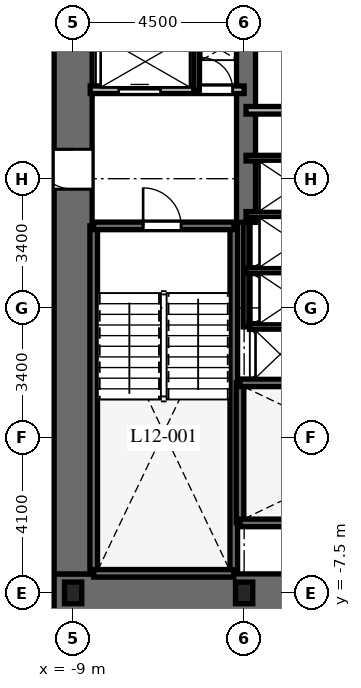
"""IFC4 building model, lengths in metres.
Left out: names, types, materials, properties, quantities, classifications, styles, units other than length and angle.
Written with IfcOpenShell. Run it as: python <this file> out.ifc"""

import sys

from ifc_helpers import new_model, si_unit, direction, frame, frame_2d, origin, origin_2d, place, context, subcontext, project, spatial, rectangle, i_section, extrude, element, fill, save


model = new_model("IFC4")
c1 = context("Model", 3, precision=1e-05, world=origin(), true_north=direction((0.0, 1.0)))
c2 = subcontext(c1, "Body", "Model", "MODEL_VIEW")
j1 = project(units=[si_unit("LENGTHUNIT", "METRE"), si_unit("PLANEANGLEUNIT", "RADIAN")], contexts=[c1])
p1 = place(None, origin())
s1 = spatial("IfcSite", under=j1, at=p1, CompositionType="ELEMENT")
p2 = place(p1, origin())
s2 = spatial("IfcBuilding", under=s1, at=p2, CompositionType="ELEMENT")
p3 = place(p2, frame((0.0, 0.0, 56.4)))
s3 = spatial("IfcBuildingStorey", under=s2, at=p3, CompositionType="ELEMENT", Elevation=56.4)
p4 = place(p3, frame((-9.5, -7.5, 0.0), z_axis=(0.0, 0.0, 1.0), x_axis=(1.0, 0.0, 0.0)))
e1 = element("IfcWall", 1, at=p4, inside=s3, PredefinedType="SHEAR", context=c2, shape_type="SweptSolid", body=[
    extrude(rectangle(XDim=19.0, YDim=1.0, at=frame_2d((9.5, 0.0))), origin(), (0.0, 0.0, 1.0), 3.7),
])
p5 = place(p4, frame((9.55, 0.0, 0.0)))
e2 = element("IfcOpeningElement", 2, at=p5, cuts=e1, PredefinedType="OPENING", context=c2, shape_type="SweptSolid", body=[
    extrude(rectangle(XDim=1.0, YDim=2.15, at=frame_2d((0.5, 1.075))), frame((0.0, 0.51, 0.0), z_axis=(0.0, -1.0, 0.0), x_axis=(1.0, 0.0, 0.0)), (0.0, 0.0, 1.0), 1.02),
])
p6 = place(p3, frame((-9.0, -7.0, 0.0), z_axis=(0.0, 0.0, 1.0), x_axis=(0.0, 1.0, 0.0)))
e3 = element("IfcWall", 3, at=p6, inside=s3, PredefinedType="SHEAR", context=c2, shape_type="SweptSolid", body=[
    extrude(rectangle(XDim=14.0, YDim=1.0, at=frame_2d((7.0, 0.0))), origin(), (0.0, 0.0, 1.0), 3.7),
])
p7 = place(p6, frame((10.125, 0.0, 0.0)))
e4 = element("IfcOpeningElement", 4, at=p7, cuts=e3, PredefinedType="OPENING", context=c2, shape_type="SweptSolid", body=[
    extrude(rectangle(XDim=1.05, YDim=2.15, at=frame_2d((0.525, 1.075))), frame((0.0, 0.51, 0.0), z_axis=(0.0, -1.0, 0.0), x_axis=(1.0, 0.0, 0.0)), (0.0, 0.0, 1.0), 1.02),
])
p8 = place(p3, frame((-4.45, 2.25, 0.0), z_axis=(0.0, 0.0, 1.0), x_axis=(0.0, 1.0, 0.0)))
e5 = element("IfcWall", 5, at=p8, inside=s3, PredefinedType="SHEAR", context=c2, shape_type="SweptSolid", body=[
    extrude(rectangle(XDim=4.75, YDim=0.5, at=frame_2d((2.375, 0.0))), origin(), (0.0, 0.0, 1.0), 3.7),
])
for number, where, z_axis, x_axis in (
    (6, (-8.458, -6.985, 0.0), (0.0, 0.0, 1.0), (0.0, 1.0, 0.0)),
    (7, (-4.772, -6.985, 0.0), (0.0, 0.0, 1.0), (0.0, 1.0, 0.0)),
):
    element("IfcWall", number, at=place(p3, frame(where, z_axis=z_axis, x_axis=x_axis)), inside=s3, PredefinedType="SHEAR", context=c2, shape_type="SweptSolid", body=[
        extrude(rectangle(XDim=9.143, YDim=0.2, at=frame_2d((4.572, 0.0))), origin(), (0.0, 0.0, 1.0), 3.7),
    ])
p9 = place(p3, frame((-8.458, -6.985, 0.0), z_axis=(0.0, 0.0, 1.0), x_axis=(1.0, 0.0, 0.0)))
e8 = element("IfcWall", 8, at=p9, inside=s3, PredefinedType="SHEAR", context=c2, shape_type="SweptSolid", body=[
    extrude(rectangle(XDim=3.686, YDim=0.2, at=frame_2d((1.843, 0.0))), origin(), (0.0, 0.0, 1.0), 3.7),
])
p10 = place(p3, frame((-8.458, 2.158, 0.0), z_axis=(0.0, 0.0, 1.0), x_axis=(1.0, 0.0, 0.0)))
e9 = element("IfcWall", 9, at=p10, inside=s3, PredefinedType="SHEAR", context=c2, shape_type="SweptSolid", body=[
    extrude(rectangle(XDim=3.686, YDim=0.2, at=frame_2d((1.843, 0.0))), origin(), (0.0, 0.0, 1.0), 3.7),
])
p11 = place(p10, frame((1.3, 0.0, 0.0)))
e10 = element("IfcOpeningElement", 10, at=p11, cuts=e9, PredefinedType="OPENING", context=c2, shape_type="SweptSolid", body=[
    extrude(rectangle(XDim=1.0, YDim=2.15, at=frame_2d((0.5, 1.075))), frame((0.0, 0.11, 0.0), z_axis=(0.0, -1.0, 0.0), x_axis=(1.0, 0.0, 0.0)), (0.0, 0.0, 1.0), 0.22),
])
p12 = place(p3, frame((-4.608, -5.658, 0.0), z_axis=(0.0, 0.0, 1.0), x_axis=(0.0, 1.0, 0.0)))
e11 = element("IfcWall", 11, at=p12, inside=s3, PredefinedType="SHEAR", context=c2, shape_type="SweptSolid", body=[
    extrude(rectangle(XDim=3.686, YDim=0.2, at=frame_2d((1.843, 0.0))), origin(), (0.0, 0.0, 1.0), 3.7),
])
p13 = place(p3, frame((-4.608, -5.658, 0.0), z_axis=(0.0, 0.0, 1.0), x_axis=(1.0, 0.0, 0.0)))
e12 = element("IfcWall", 12, at=p13, inside=s3, PredefinedType="SHEAR", context=c2, shape_type="SweptSolid", body=[
    extrude(rectangle(XDim=9.166, YDim=0.2, at=frame_2d((4.583, 0.0))), origin(), (0.0, 0.0, 1.0), 3.7),
])
p14 = place(p13, frame((7.45, 0.0, 0.0)))
e13 = element("IfcOpeningElement", 13, at=p14, cuts=e12, PredefinedType="OPENING", context=c2, shape_type="SweptSolid", body=[
    extrude(rectangle(XDim=1.0, YDim=2.15, at=frame_2d((0.5, 1.075))), frame((0.0, 0.11, 0.0), z_axis=(0.0, -1.0, 0.0), x_axis=(1.0, 0.0, 0.0)), (0.0, 0.0, 1.0), 0.22),
])
p15 = place(p3, frame((-4.608, -1.972, 0.0), z_axis=(0.0, 0.0, 1.0), x_axis=(1.0, 0.0, 0.0)))
e14 = element("IfcWall", 14, at=p15, inside=s3, PredefinedType="SHEAR", context=c2, shape_type="SweptSolid", body=[
    extrude(rectangle(XDim=9.166, YDim=0.2, at=frame_2d((4.583, 0.0))), origin(), (0.0, 0.0, 1.0), 3.7),
])
for number, where, z_axis, x_axis in (
    (15, (-9.0, -7.5, 0.0), (0.0, 0.0, 1.0), (1.0, 0.0, 0.0)),
    (16, (-4.5, -7.5, 0.0), (0.0, 0.0, 1.0), (1.0, 0.0, 0.0)),
):
    element("IfcColumn", number, at=place(p3, frame(where, z_axis=z_axis, x_axis=x_axis)), inside=s3, PredefinedType="COLUMN", context=c2, shape_type="SweptSolid", body=[
        extrude(i_section(OverallWidth=0.454, OverallDepth=0.569, WebThickness=0.078, FlangeThickness=0.125, at=origin_2d()), origin(), (0.0, 0.0, 1.0), 3.7),
    ])
p16 = place(p3, frame((-8.55, 5.74, 0.0), z_axis=(0.0, 0.0, 1.0), x_axis=(1.0, 0.0, 0.0)))
e17 = element("IfcWall", 17, at=p16, inside=s3, PredefinedType="PARTITIONING", context=c2, shape_type="SweptSolid", body=[
    extrude(rectangle(XDim=4.05, YDim=0.2, at=frame_2d((2.025, 0.0))), origin(), (0.0, 0.0, 1.0), 3.4),
])
p17 = place(p16, frame((0.75, 0.0, 0.0)))
e18 = element("IfcOpeningElement", 18, at=p17, cuts=e17, PredefinedType="OPENING", context=c2, shape_type="SweptSolid", body=[
    extrude(rectangle(XDim=1.1, YDim=2.2, at=frame_2d((0.55, 1.1))), frame((0.0, 0.11, 0.0), z_axis=(0.0, -1.0, 0.0), x_axis=(1.0, 0.0, 0.0)), (0.0, 0.0, 1.0), 0.22),
])
p18 = place(p16, frame((2.9, 0.0, 0.0)))
e19 = element("IfcOpeningElement", 19, at=p18, cuts=e17, PredefinedType="OPENING", context=c2, shape_type="SweptSolid", body=[
    extrude(rectangle(XDim=0.85, YDim=2.03, at=frame_2d((0.425, 1.015))), frame((0.0, 0.11, 0.0), z_axis=(0.0, -1.0, 0.0), x_axis=(1.0, 0.0, 0.0)), (0.0, 0.0, 1.0), 0.22),
])
p19 = place(p3, frame((-5.75, 5.74, 0.0), z_axis=(0.0, 0.0, 1.0), x_axis=(0.0, 1.0, 0.0)))
e20 = element("IfcWall", 20, at=p19, inside=s3, PredefinedType="PARTITIONING", context=c2, shape_type="SweptSolid", body=[
    extrude(rectangle(XDim=1.41, YDim=0.15, at=frame_2d((0.705, 0.0))), origin(), (0.0, 0.0, 1.0), 3.4),
])
p20 = place(p3, frame((-4.45, 5.2, 0.0), z_axis=(0.0, 0.0, 1.0), x_axis=(1.0, 0.0, 0.0)))
e21 = element("IfcWall", 21, at=p20, inside=s3, PredefinedType="PARTITIONING", context=c2, shape_type="SweptSolid", body=[
    extrude(rectangle(XDim=4.5, YDim=0.2, at=frame_2d((2.25, 0.0))), origin(), (0.0, 0.0, 1.0), 3.4),
])
p21 = place(p3, frame((-4.45, -0.5, 0.0), z_axis=(0.0, 0.0, 1.0), x_axis=(0.0, 1.0, 0.0)))
e22 = element("IfcWall", 22, at=p21, inside=s3, PredefinedType="PARTITIONING", context=c2, shape_type="SweptSolid", body=[
    extrude(rectangle(XDim=2.75, YDim=0.15, at=frame_2d((1.375, 0.0))), origin(), (0.0, 0.0, 1.0), 3.4),
])
for number, where, z_axis, x_axis in (
    (23, (-4.45, 3.94, 0.0), (0.0, 0.0, 1.0), (1.0, 0.0, 0.0)),
    (24, (-4.45, 0.98, 0.0), (0.0, 0.0, 1.0), (1.0, 0.0, 0.0)),
    (25, (-4.45, 2.46, 0.0), (0.0, 0.0, 1.0), (1.0, 0.0, 0.0)),
):
    element("IfcWall", number, at=place(p3, frame(where, z_axis=z_axis, x_axis=x_axis)), inside=s3, PredefinedType="PARTITIONING", context=c2, shape_type="SweptSolid", body=[
        extrude(rectangle(XDim=2.55, YDim=0.15, at=frame_2d((1.275, 0.0))), origin(), (0.0, 0.0, 1.0), 3.4),
    ])
p22 = place(p3, frame((-4.36, -0.49, 0.0), z_axis=(0.0, 0.0, 1.0), x_axis=(1.0, 0.0, 0.0)))
e26 = element("IfcWall", 26, at=p22, inside=s3, PredefinedType="PARTITIONING", context=c2, shape_type="SweptSolid", body=[
    extrude(rectangle(XDim=8.72, YDim=0.15, at=frame_2d((4.36, 0.0))), origin(), (0.0, 0.0, 1.0), 3.4),
])
p23 = place(p22, frame((2.81, 0.0, 0.0)))
e27 = element("IfcOpeningElement", 27, at=p23, cuts=e26, PredefinedType="OPENING", context=c2, shape_type="SweptSolid", body=[
    extrude(rectangle(XDim=0.85, YDim=2.03, at=frame_2d((0.425, 1.015))), frame((0.0, 0.085, 0.0), z_axis=(0.0, -1.0, 0.0), x_axis=(1.0, 0.0, 0.0)), (0.0, 0.0, 1.0), 0.17),
])
p24 = place(p22, frame((4.61, 0.0, 0.0)))
e28 = element("IfcOpeningElement", 28, at=p24, cuts=e26, PredefinedType="OPENING", context=c2, shape_type="SweptSolid", body=[
    extrude(rectangle(XDim=0.85, YDim=2.03, at=frame_2d((0.425, 1.015))), frame((0.0, 0.085, 0.0), z_axis=(0.0, -1.0, 0.0), x_axis=(1.0, 0.0, 0.0)), (0.0, 0.0, 1.0), 0.17),
])
p25 = place(p11, origin())
e29 = element("IfcDoor", 29, at=p25, inside=s3, OperationType="SINGLE_SWING_LEFT", PredefinedType="DOOR", context=c2, shape_type="SweptSolid", body=[
    extrude(rectangle(XDim=1.0, YDim=2.15, at=frame_2d((0.5, 1.075))), frame((0.0, 0.025, 0.0), z_axis=(0.0, -1.0, 0.0), x_axis=(1.0, 0.0, 0.0)), (0.0, 0.0, 1.0), 0.05),
])
fill(e10, e29)
p26 = place(p7, origin())
e30 = element("IfcDoor", 30, at=p26, inside=s3, OperationType="SINGLE_SWING_RIGHT", PredefinedType="DOOR", context=c2, shape_type="SweptSolid", body=[
    extrude(rectangle(XDim=1.05, YDim=2.15, at=frame_2d((0.525, 1.075))), frame((0.0, 0.025, 0.0), z_axis=(0.0, -1.0, 0.0), x_axis=(1.0, 0.0, 0.0)), (0.0, 0.0, 1.0), 0.05),
])
fill(e4, e30)
p27 = place(p17, origin())
e31 = element("IfcDoor", 31, at=p27, inside=s3, OperationType="SLIDING_TO_LEFT", PredefinedType="DOOR", context=c2, shape_type="SweptSolid", body=[
    extrude(rectangle(XDim=1.1, YDim=2.2, at=frame_2d((0.55, 1.1))), frame((0.0, 0.025, 0.0), z_axis=(0.0, -1.0, 0.0), x_axis=(1.0, 0.0, 0.0)), (0.0, 0.0, 1.0), 0.05),
])
fill(e18, e31)
p28 = place(p18, origin())
e32 = element("IfcDoor", 32, at=p28, inside=s3, OperationType="SINGLE_SWING_LEFT", PredefinedType="DOOR", context=c2, shape_type="SweptSolid", body=[
    extrude(rectangle(XDim=0.85, YDim=2.03, at=frame_2d((0.425, 1.015))), frame((0.0, 0.025, 0.0), z_axis=(0.0, -1.0, 0.0), x_axis=(1.0, 0.0, 0.0)), (0.0, 0.0, 1.0), 0.05),
])
fill(e19, e32)
save(model, sys.argv[1])
